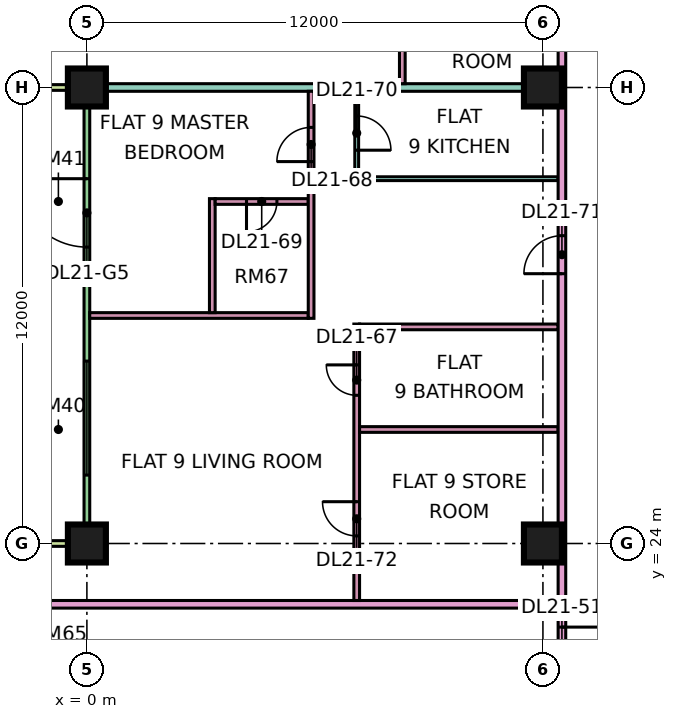
"""IFC4 building model, lengths in metres.
Left out: names, types, materials, properties, quantities, classifications, styles, units other than length and angle.
Written with IfcOpenShell. Run it as: python <this file> out.ifc"""

import sys

from ifc_helpers import new_model, si_unit, direction, frame, frame_2d, origin, origin_2d, place, context, subcontext, project, spatial, rectangle, extrude, element, fill, save


model = new_model("IFC4")
c1 = context("Model", 3, precision=1e-05, world=origin(), true_north=direction((0.0, 1.0)))
c2 = subcontext(c1, "Body", "Model", "MODEL_VIEW")
j1 = project(units=[si_unit("LENGTHUNIT", "METRE"), si_unit("PLANEANGLEUNIT", "RADIAN")], contexts=[c1])
p1 = place(None, origin())
s1 = spatial("IfcSite", under=j1, at=p1, CompositionType="ELEMENT")
p2 = place(p1, origin())
s2 = spatial("IfcBuilding", under=s1, at=p2, CompositionType="ELEMENT")
p3 = place(p2, frame((0.0, 0.0, 95.65)))
s3 = spatial("IfcBuildingStorey", under=s2, at=p3, CompositionType="ELEMENT", Elevation=95.65)
p4 = place(p3, frame((0.0, 24.0, 0.0), z_axis=(0.0, 0.0, 1.0), x_axis=(1.0, 0.0, 0.0)))
e1 = element("IfcColumn", 1, at=p4, inside=s3, PredefinedType="COLUMN", context=c2, shape_type="SweptSolid", body=[
    extrude(rectangle(XDim=1.0, YDim=1.0, at=origin_2d()), origin(), (0.0, 0.0, 1.0), 3.75),
])
p5 = place(p3, frame((0.0, 36.0, 0.0), z_axis=(0.0, 0.0, 1.0), x_axis=(1.0, 0.0, 0.0)))
e2 = element("IfcColumn", 2, at=p5, inside=s3, PredefinedType="COLUMN", context=c2, shape_type="SweptSolid", body=[
    extrude(rectangle(XDim=1.0, YDim=1.0, at=origin_2d()), origin(), (0.0, 0.0, 1.0), 3.75),
])
for number, where, z_axis, x_axis in (
    (3, (12.0, 24.0, 0.0), (0.0, 0.0, 1.0), (1.0, 0.0, 0.0)),
    (4, (12.0, 36.0, 0.0), (0.0, 0.0, 1.0), (1.0, 0.0, 0.0)),
):
    element("IfcColumn", number, at=place(p3, frame(where, z_axis=z_axis, x_axis=x_axis)), inside=s3, PredefinedType="COLUMN", context=c2, shape_type="SweptSolid", body=[
        extrude(rectangle(XDim=1.0, YDim=1.0, at=origin_2d()), origin(), (0.0, 0.0, 1.0), 3.75),
    ])
p6 = place(p3, frame((0.0, 35.925, 0.0), z_axis=(0.0, 0.0, 1.0), x_axis=(0.0, -1.0, 0.0)))
e5 = element("IfcWall", 5, at=p6, inside=s3, PredefinedType="SOLIDWALL", context=c2, shape_type="SweptSolid", body=[
    extrude(rectangle(XDim=11.85, YDim=0.15, at=frame_2d((5.925, 0.0))), origin(), (0.0, 0.0, 1.0), 3.35),
])
p7 = place(p6, frame((2.325, 0.0, 0.0)))
e6 = element("IfcOpeningElement", 6, at=p7, cuts=e5, PredefinedType="OPENING", context=c2, shape_type="SweptSolid", body=[
    extrude(rectangle(XDim=1.8, YDim=2.4, at=frame_2d((0.9, 1.2))), frame((0.0, 0.085, 0.0), z_axis=(0.0, -1.0, 0.0), x_axis=(1.0, 0.0, 0.0)), (0.0, 0.0, 1.0), 0.17),
])
p8 = place(p6, frame((7.125, 0.0, 0.45)))
e7 = element("IfcOpeningElement", 7, at=p8, cuts=e5, PredefinedType="OPENING", context=c2, shape_type="SweptSolid", body=[
    extrude(rectangle(XDim=3.0, YDim=2.4, at=frame_2d((1.5, 1.2))), frame((0.0, 0.085, 0.0), z_axis=(0.0, -1.0, 0.0), x_axis=(1.0, 0.0, 0.0)), (0.0, 0.0, 1.0), 0.17),
])
for number, where, z_axis, x_axis in (
    (8, (-1.5, 36.0, 0.0), (0.0, 0.0, 1.0), (1.0, 0.0, 0.0)),
    (9, (-1.5, 24.0, 0.0), (0.0, 0.0, 1.0), (1.0, 0.0, 0.0)),
):
    element("IfcWall", number, at=place(p3, frame(where, z_axis=z_axis, x_axis=x_axis)), inside=s3, PredefinedType="SOLIDWALL", context=c2, shape_type="SweptSolid", body=[
        extrude(rectangle(XDim=1.5, YDim=0.15, at=frame_2d((0.75, 0.0))), origin(), (0.0, 0.0, 1.0), 3.35),
    ])
p9 = place(p3, frame((-1.35, 22.4, 0.0), z_axis=(0.0, 0.0, 1.0), x_axis=(1.0, 0.0, 0.0)))
e10 = element("IfcWall", 10, at=p9, inside=s3, PredefinedType="PARTITIONING", context=c2, shape_type="SweptSolid", body=[
    extrude(rectangle(XDim=13.75, YDim=0.2, at=frame_2d((6.875, 0.0))), origin(), (0.0, 0.0, 1.0), 3.35),
])
e11 = element("IfcWall", 11, at=p5, inside=s3, PredefinedType="PARTITIONING", context=c2, shape_type="SweptSolid", body=[
    extrude(rectangle(XDim=12.4, YDim=0.2, at=frame_2d((6.2, 0.0))), origin(), (0.0, 0.0, 1.0), 3.35),
])
p10 = place(p3, frame((0.074, 30.0, 0.0), z_axis=(0.0, 0.0, 1.0), x_axis=(1.0, 0.0, 0.0)))
e12 = element("IfcWall", 12, at=p10, inside=s3, PredefinedType="PARTITIONING", context=c2, shape_type="SweptSolid", body=[
    extrude(rectangle(XDim=5.751, YDim=0.15, at=frame_2d((2.875, 0.0))), origin(), (0.0, 0.0, 1.0), 3.35),
])
p11 = place(p3, frame((3.3, 30.075, 0.0), z_axis=(0.0, 0.0, 1.0), x_axis=(0.0, 1.0, 0.0)))
e13 = element("IfcWall", 13, at=p11, inside=s3, PredefinedType="PARTITIONING", context=c2, shape_type="SweptSolid", body=[
    extrude(rectangle(XDim=3.0, YDim=0.15, at=frame_2d((1.5, 0.0))), origin(), (0.0, 0.0, 1.0), 3.35),
])
p12 = place(p3, frame((3.375, 33.0, 0.0), z_axis=(0.0, 0.0, 1.0), x_axis=(1.0, 0.0, 0.0)))
e14 = element("IfcWall", 14, at=p12, inside=s3, PredefinedType="PARTITIONING", context=c2, shape_type="SweptSolid", body=[
    extrude(rectangle(XDim=2.45, YDim=0.15, at=frame_2d((1.225, 0.0))), origin(), (0.0, 0.0, 1.0), 3.35),
])
p13 = place(p12, frame((0.825, 0.0, 0.0)))
e15 = element("IfcOpeningElement", 15, at=p13, cuts=e14, PredefinedType="OPENING", context=c2, shape_type="SweptSolid", body=[
    extrude(rectangle(XDim=0.8, YDim=2.1, at=frame_2d((0.4, 1.05))), frame((0.0, 0.085, 0.0), z_axis=(0.0, -1.0, 0.0), x_axis=(1.0, 0.0, 0.0)), (0.0, 0.0, 1.0), 0.17),
])
p14 = place(p3, frame((5.9, 29.925, 0.0), z_axis=(0.0, 0.0, 1.0), x_axis=(0.0, 1.0, 0.0)))
e16 = element("IfcWall", 16, at=p14, inside=s3, PredefinedType="PARTITIONING", context=c2, shape_type="SweptSolid", body=[
    extrude(rectangle(XDim=5.975, YDim=0.15, at=frame_2d((2.987, 0.0))), origin(), (0.0, 0.0, 1.0), 3.35),
])
p15 = place(p14, frame((4.125, 0.0, 0.0)))
e17 = element("IfcOpeningElement", 17, at=p15, cuts=e16, PredefinedType="OPENING", context=c2, shape_type="SweptSolid", body=[
    extrude(rectangle(XDim=0.9, YDim=2.1, at=frame_2d((0.45, 1.05))), frame((0.0, 0.085, 0.0), z_axis=(0.0, -1.0, 0.0), x_axis=(1.0, 0.0, 0.0)), (0.0, 0.0, 1.0), 0.17),
])
p16 = place(p3, frame((7.05, 33.6, 0.0), z_axis=(0.0, 0.0, 1.0), x_axis=(1.0, 0.0, 0.0)))
e18 = element("IfcWall", 18, at=p16, inside=s3, PredefinedType="PARTITIONING", context=c2, shape_type="SweptSolid", body=[
    extrude(rectangle(XDim=5.35, YDim=0.1, at=frame_2d((2.675, 0.0))), origin(), (0.0, 0.0, 1.0), 3.35),
])
p17 = place(p3, frame((7.1, 22.5, 0.0), z_axis=(0.0, 0.0, 1.0), x_axis=(0.0, 1.0, 0.0)))
e19 = element("IfcWall", 19, at=p17, inside=s3, PredefinedType="PARTITIONING", context=c2, shape_type="SweptSolid", body=[
    extrude(rectangle(XDim=7.275, YDim=0.15, at=frame_2d((3.637, 0.0))), origin(), (0.0, 0.0, 1.0), 3.35),
])
p18 = place(p17, frame((5.4, 0.0, 0.0)))
e20 = element("IfcOpeningElement", 20, at=p18, cuts=e19, PredefinedType="OPENING", context=c2, shape_type="SweptSolid", body=[
    extrude(rectangle(XDim=0.8, YDim=2.1, at=frame_2d((0.4, 1.05))), frame((0.0, 0.085, 0.0), z_axis=(0.0, -1.0, 0.0), x_axis=(1.0, 0.0, 0.0)), (0.0, 0.0, 1.0), 0.17),
])
p19 = place(p17, frame((1.7, 0.0, 0.0)))
e21 = element("IfcOpeningElement", 21, at=p19, cuts=e19, PredefinedType="OPENING", context=c2, shape_type="SweptSolid", body=[
    extrude(rectangle(XDim=0.9, YDim=2.1, at=frame_2d((0.45, 1.05))), frame((0.0, 0.085, 0.0), z_axis=(0.0, -1.0, 0.0), x_axis=(1.0, 0.0, 0.0)), (0.0, 0.0, 1.0), 0.17),
])
p20 = place(p3, frame((7.1, 33.65, 0.0), z_axis=(0.0, 0.0, 1.0), x_axis=(0.0, 1.0, 0.0)))
e22 = element("IfcWall", 22, at=p20, inside=s3, PredefinedType="PARTITIONING", context=c2, shape_type="SweptSolid", body=[
    extrude(rectangle(XDim=2.25, YDim=0.1, at=frame_2d((1.125, 0.0))), origin(), (0.0, 0.0, 1.0), 3.35),
])
p21 = place(p20, frame((0.7, 0.0, 0.0)))
e23 = element("IfcOpeningElement", 23, at=p21, cuts=e22, PredefinedType="OPENING", context=c2, shape_type="SweptSolid", body=[
    extrude(rectangle(XDim=0.9, YDim=2.1, at=frame_2d((0.45, 1.05))), frame((0.0, 0.06, 0.0), z_axis=(0.0, -1.0, 0.0), x_axis=(1.0, 0.0, 0.0)), (0.0, 0.0, 1.0), 0.12),
])
for number, where, z_axis, x_axis in (
    (24, (7.175, 27.0, 0.0), (0.0, 0.0, 1.0), (1.0, 0.0, 0.0)),
    (25, (7.175, 29.7, 0.0), (0.0, 0.0, 1.0), (1.0, 0.0, 0.0)),
):
    element("IfcWall", number, at=place(p3, frame(where, z_axis=z_axis, x_axis=x_axis)), inside=s3, PredefinedType="PARTITIONING", context=c2, shape_type="SweptSolid", body=[
        extrude(rectangle(XDim=5.225, YDim=0.15, at=frame_2d((2.612, 0.0))), origin(), (0.0, 0.0, 1.0), 3.35),
    ])
p22 = place(p3, frame((8.3, 36.1, 0.0), z_axis=(0.0, 0.0, 1.0), x_axis=(0.0, 1.0, 0.0)))
e26 = element("IfcWall", 26, at=p22, inside=s3, PredefinedType="PARTITIONING", context=c2, shape_type="SweptSolid", body=[
    extrude(rectangle(XDim=11.375, YDim=0.15, at=frame_2d((5.688, 0.0))), origin(), (0.0, 0.0, 1.0), 3.35),
])
p23 = place(p22, frame((9.5, 0.0, 0.0)))
e27 = element("IfcOpeningElement", 27, at=p23, cuts=e26, PredefinedType="OPENING", context=c2, shape_type="SweptSolid", body=[
    extrude(rectangle(XDim=0.8, YDim=2.1, at=frame_2d((0.4, 1.05))), frame((0.0, 0.085, 0.0), z_axis=(0.0, -1.0, 0.0), x_axis=(1.0, 0.0, 0.0)), (0.0, 0.0, 1.0), 0.17),
])
p24 = place(p22, frame((5.6, 0.0, 0.0)))
e28 = element("IfcOpeningElement", 28, at=p24, cuts=e26, PredefinedType="OPENING", context=c2, shape_type="SweptSolid", body=[
    extrude(rectangle(XDim=0.9, YDim=2.1, at=frame_2d((0.45, 1.05))), frame((0.0, 0.085, 0.0), z_axis=(0.0, -1.0, 0.0), x_axis=(1.0, 0.0, 0.0)), (0.0, 0.0, 1.0), 0.17),
])
p25 = place(p22, frame((1.25, 0.0, 0.0)))
e29 = element("IfcOpeningElement", 29, at=p25, cuts=e26, PredefinedType="OPENING", context=c2, shape_type="SweptSolid", body=[
    extrude(rectangle(XDim=0.9, YDim=2.1, at=frame_2d((0.45, 1.05))), frame((0.0, 0.085, 0.0), z_axis=(0.0, -1.0, 0.0), x_axis=(1.0, 0.0, 0.0)), (0.0, 0.0, 1.0), 0.17),
])
p26 = place(p3, frame((12.5, 20.0, 0.0), z_axis=(0.0, 0.0, 1.0), x_axis=(0.0, 1.0, 0.0)))
e30 = element("IfcWall", 30, at=p26, inside=s3, PredefinedType="PARTITIONING", context=c2, shape_type="SweptSolid", body=[
    extrude(rectangle(XDim=43.0, YDim=0.2, at=frame_2d((21.5, 0.0))), origin(), (0.0, 0.0, 1.0), 3.35),
])
p27 = place(p26, frame((28.65, 0.0, 0.0)))
e31 = element("IfcOpeningElement", 31, at=p27, cuts=e30, PredefinedType="OPENING", context=c2, shape_type="SweptSolid", body=[
    extrude(rectangle(XDim=1.0, YDim=2.1, at=frame_2d((0.5, 1.05))), frame((0.0, 0.11, 0.0), z_axis=(0.0, -1.0, 0.0), x_axis=(1.0, 0.0, 0.0)), (0.0, 0.0, 1.0), 0.22),
])
p28 = place(p26, frame((32.1, 0.0, 0.0)))
e32 = element("IfcOpeningElement", 32, at=p28, cuts=e30, PredefinedType="OPENING", context=c2, shape_type="SweptSolid", body=[
    extrude(rectangle(XDim=1.0, YDim=2.1, at=frame_2d((0.5, 1.05))), frame((0.0, 0.11, 0.0), z_axis=(0.0, -1.0, 0.0), x_axis=(1.0, 0.0, 0.0)), (0.0, 0.0, 1.0), 0.22),
])
p29 = place(p26, frame((0.6, 0.0, 0.0)))
e33 = element("IfcOpeningElement", 33, at=p29, cuts=e30, PredefinedType="OPENING", context=c2, shape_type="SweptSolid", body=[
    extrude(rectangle(XDim=1.2, YDim=2.1, at=frame_2d((0.6, 1.05))), frame((0.0, 0.11, 0.0), z_axis=(0.0, -1.0, 0.0), x_axis=(1.0, 0.0, 0.0)), (0.0, 0.0, 1.0), 0.22),
])
p30 = place(p26, frame((11.1, 0.0, 0.0)))
e34 = element("IfcOpeningElement", 34, at=p30, cuts=e30, PredefinedType="OPENING", context=c2, shape_type="SweptSolid", body=[
    extrude(rectangle(XDim=1.0, YDim=2.1, at=frame_2d((0.5, 1.05))), frame((0.0, 0.11, 0.0), z_axis=(0.0, -1.0, 0.0), x_axis=(1.0, 0.0, 0.0)), (0.0, 0.0, 1.0), 0.22),
])
p31 = place(p7, frame((1.8, 0.0, 0.0), z_axis=(0.0, 0.0, 1.0), x_axis=(-1.0, 0.0, 0.0)))
e35 = element("IfcDoor", 35, at=p31, inside=s3, OperationType="DOUBLE_DOOR_SINGLE_SWING", PredefinedType="DOOR", context=c2, shape_type="SweptSolid", body=[
    extrude(rectangle(XDim=1.8, YDim=2.4, at=frame_2d((0.9, 1.2))), frame((0.0, 0.025, 0.0), z_axis=(0.0, -1.0, 0.0), x_axis=(1.0, 0.0, 0.0)), (0.0, 0.0, 1.0), 0.05),
])
fill(e6, e35)
p32 = place(p8, origin())
e36 = element("IfcWindow", 36, at=p32, inside=s3, PartitioningType="SINGLE_PANEL", PredefinedType="WINDOW", context=c2, shape_type="SweptSolid", body=[
    extrude(rectangle(XDim=3.0, YDim=2.4, at=frame_2d((1.5, 1.2))), frame((0.0, 0.03, 0.0), z_axis=(0.0, -1.0, 0.0), x_axis=(1.0, 0.0, 0.0)), (0.0, 0.0, 1.0), 0.06),
])
fill(e7, e36)
p33 = place(p29, origin())
e37 = element("IfcDoor", 37, at=p33, inside=s3, OperationType="SINGLE_SWING_RIGHT", PredefinedType="DOOR", context=c2, shape_type="SweptSolid", body=[
    extrude(rectangle(XDim=1.2, YDim=2.1, at=frame_2d((0.6, 1.05))), frame((0.0, 0.025, 0.0), z_axis=(0.0, -1.0, 0.0), x_axis=(1.0, 0.0, 0.0)), (0.0, 0.0, 1.0), 0.05),
])
fill(e33, e37)
p34 = place(p18, frame((0.8, 0.0, 0.0), z_axis=(0.0, 0.0, 1.0), x_axis=(-1.0, 0.0, 0.0)))
e38 = element("IfcDoor", 38, at=p34, inside=s3, OperationType="SINGLE_SWING_RIGHT", PredefinedType="DOOR", context=c2, shape_type="SweptSolid", body=[
    extrude(rectangle(XDim=0.8, YDim=2.1, at=frame_2d((0.4, 1.05))), frame((0.0, 0.025, 0.0), z_axis=(0.0, -1.0, 0.0), x_axis=(1.0, 0.0, 0.0)), (0.0, 0.0, 1.0), 0.05),
])
fill(e20, e38)
p35 = place(p15, origin())
e39 = element("IfcDoor", 39, at=p35, inside=s3, OperationType="SINGLE_SWING_LEFT", PredefinedType="DOOR", context=c2, shape_type="SweptSolid", body=[
    extrude(rectangle(XDim=0.9, YDim=2.1, at=frame_2d((0.45, 1.05))), frame((0.0, 0.025, 0.0), z_axis=(0.0, -1.0, 0.0), x_axis=(1.0, 0.0, 0.0)), (0.0, 0.0, 1.0), 0.05),
])
fill(e17, e39)
p36 = place(p13, frame((0.8, 0.0, 0.0), z_axis=(0.0, 0.0, 1.0), x_axis=(-1.0, 0.0, 0.0)))
e40 = element("IfcDoor", 40, at=p36, inside=s3, OperationType="SINGLE_SWING_LEFT", PredefinedType="DOOR", context=c2, shape_type="SweptSolid", body=[
    extrude(rectangle(XDim=0.8, YDim=2.1, at=frame_2d((0.4, 1.05))), frame((0.0, 0.025, 0.0), z_axis=(0.0, -1.0, 0.0), x_axis=(1.0, 0.0, 0.0)), (0.0, 0.0, 1.0), 0.05),
])
fill(e15, e40)
p37 = place(p21, frame((0.9, 0.0, 0.0), z_axis=(0.0, 0.0, 1.0), x_axis=(-1.0, 0.0, 0.0)))
e41 = element("IfcDoor", 41, at=p37, inside=s3, OperationType="SINGLE_SWING_LEFT", PredefinedType="DOOR", context=c2, shape_type="SweptSolid", body=[
    extrude(rectangle(XDim=0.9, YDim=2.1, at=frame_2d((0.45, 1.05))), frame((0.0, 0.025, 0.0), z_axis=(0.0, -1.0, 0.0), x_axis=(1.0, 0.0, 0.0)), (0.0, 0.0, 1.0), 0.05),
])
fill(e23, e41)
p38 = place(p30, origin())
e42 = element("IfcDoor", 42, at=p38, inside=s3, OperationType="SINGLE_SWING_LEFT", PredefinedType="DOOR", context=c2, shape_type="SweptSolid", body=[
    extrude(rectangle(XDim=1.0, YDim=2.1, at=frame_2d((0.5, 1.05))), frame((0.0, 0.025, 0.0), z_axis=(0.0, -1.0, 0.0), x_axis=(1.0, 0.0, 0.0)), (0.0, 0.0, 1.0), 0.05),
])
fill(e34, e42)
p39 = place(p19, frame((0.9, 0.0, 0.0), z_axis=(0.0, 0.0, 1.0), x_axis=(-1.0, 0.0, 0.0)))
e43 = element("IfcDoor", 43, at=p39, inside=s3, OperationType="SINGLE_SWING_RIGHT", PredefinedType="DOOR", context=c2, shape_type="SweptSolid", body=[
    extrude(rectangle(XDim=0.9, YDim=2.1, at=frame_2d((0.45, 1.05))), frame((0.0, 0.025, 0.0), z_axis=(0.0, -1.0, 0.0), x_axis=(1.0, 0.0, 0.0)), (0.0, 0.0, 1.0), 0.05),
])
fill(e21, e43)
save(model, sys.argv[1])
